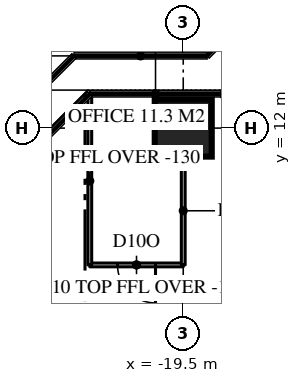
"""IFC4 building model, lengths in metres.
Left out: names, types, materials, properties, quantities, classifications, styles, units other than length and angle.
Written with IfcOpenShell. Run it as: python <this file> out.ifc"""

import sys

from ifc_helpers import new_model, si_unit, direction, frame, frame_2d, origin, origin_2d, place, context, subcontext, project, spatial, rectangle, extrude, element, fill, save


model = new_model("IFC4")
c1 = context("Model", 3, precision=1e-05, world=origin(), true_north=direction((0.0, 1.0)))
c2 = subcontext(c1, "Body", "Model", "MODEL_VIEW")
j1 = project(units=[si_unit("LENGTHUNIT", "METRE"), si_unit("PLANEANGLEUNIT", "RADIAN")], contexts=[c1])
p1 = place(None, origin())
s1 = spatial("IfcSite", under=j1, at=p1, CompositionType="ELEMENT")
p2 = place(p1, origin())
s2 = spatial("IfcBuilding", under=s1, at=p2, CompositionType="ELEMENT")
p3 = place(p2, frame((0.0, 0.0, 204.9)))
s3 = spatial("IfcBuildingStorey", under=s2, at=p3, CompositionType="ELEMENT", Elevation=204.9)
p4 = place(p3, frame((-19.5, 12.0, 0.0), z_axis=(0.0, 0.0, 1.0), x_axis=(1.0, 0.0, 0.0)))
e1 = element("IfcColumn", 1, at=p4, inside=s3, PredefinedType="COLUMN", context=c2, shape_type="SweptSolid", body=[
    extrude(rectangle(XDim=1.5, YDim=1.5, at=origin_2d()), origin(), (0.0, 0.0, 1.0), 3.9),
])
p5 = place(p3, frame((-19.5, 8.4, 0.0), z_axis=(0.0, 0.0, 1.0), x_axis=(-1.0, 0.0, 0.0)))
e2 = element("IfcWall", 2, at=p5, inside=s3, PredefinedType="PARTITIONING", context=c2, shape_type="SweptSolid", body=[
    extrude(rectangle(XDim=2.459, YDim=0.1, at=frame_2d((1.229, 0.0))), origin(), (0.0, 0.0, 1.0), 3.77),
])
p6 = place(p5, frame((0.729, 0.0, 0.0)))
e3 = element("IfcOpeningElement", 3, at=p6, cuts=e2, PredefinedType="OPENING", context=c2, shape_type="SweptSolid", body=[
    extrude(rectangle(XDim=1.0, YDim=2.2, at=frame_2d((0.5, 1.1))), frame((0.0, 0.06, 0.0), z_axis=(0.0, -1.0, 0.0), x_axis=(1.0, 0.0, 0.0)), (0.0, 0.0, 1.0), 0.12),
])
p7 = place(p3, frame((-19.5, 8.4, 0.0), z_axis=(0.0, 0.0, 1.0), x_axis=(0.0, 1.0, 0.0)))
e4 = element("IfcWall", 4, at=p7, inside=s3, PredefinedType="PARTITIONING", context=c2, shape_type="SweptSolid", body=[
    extrude(rectangle(XDim=2.85, YDim=0.1, at=frame_2d((1.425, 0.0))), origin(), (0.0, 0.0, 1.0), 3.18),
])
p8 = place(p3, frame((-21.959, 8.4, 0.0), z_axis=(0.0, 0.0, 1.0), x_axis=(0.0, 1.0, 0.0)))
e5 = element("IfcWall", 5, at=p8, inside=s3, PredefinedType="PARTITIONING", context=c2, shape_type="SweptSolid", body=[
    extrude(rectangle(XDim=4.42, YDim=0.1, at=frame_2d((2.21, 0.0))), origin(), (0.0, 0.0, 1.0), 3.77),
])
p9 = place(p6, origin())
e6 = element("IfcDoor", 6, at=p9, inside=s3, OperationType="SINGLE_SWING_LEFT", PredefinedType="DOOR", context=c2, shape_type="SweptSolid", body=[
    extrude(rectangle(XDim=1.0, YDim=2.2, at=frame_2d((0.5, 1.1))), frame((0.0, 0.025, 0.0), z_axis=(0.0, -1.0, 0.0), x_axis=(1.0, 0.0, 0.0)), (0.0, 0.0, 1.0), 0.05),
])
fill(e3, e6)
save(model, sys.argv[1])
